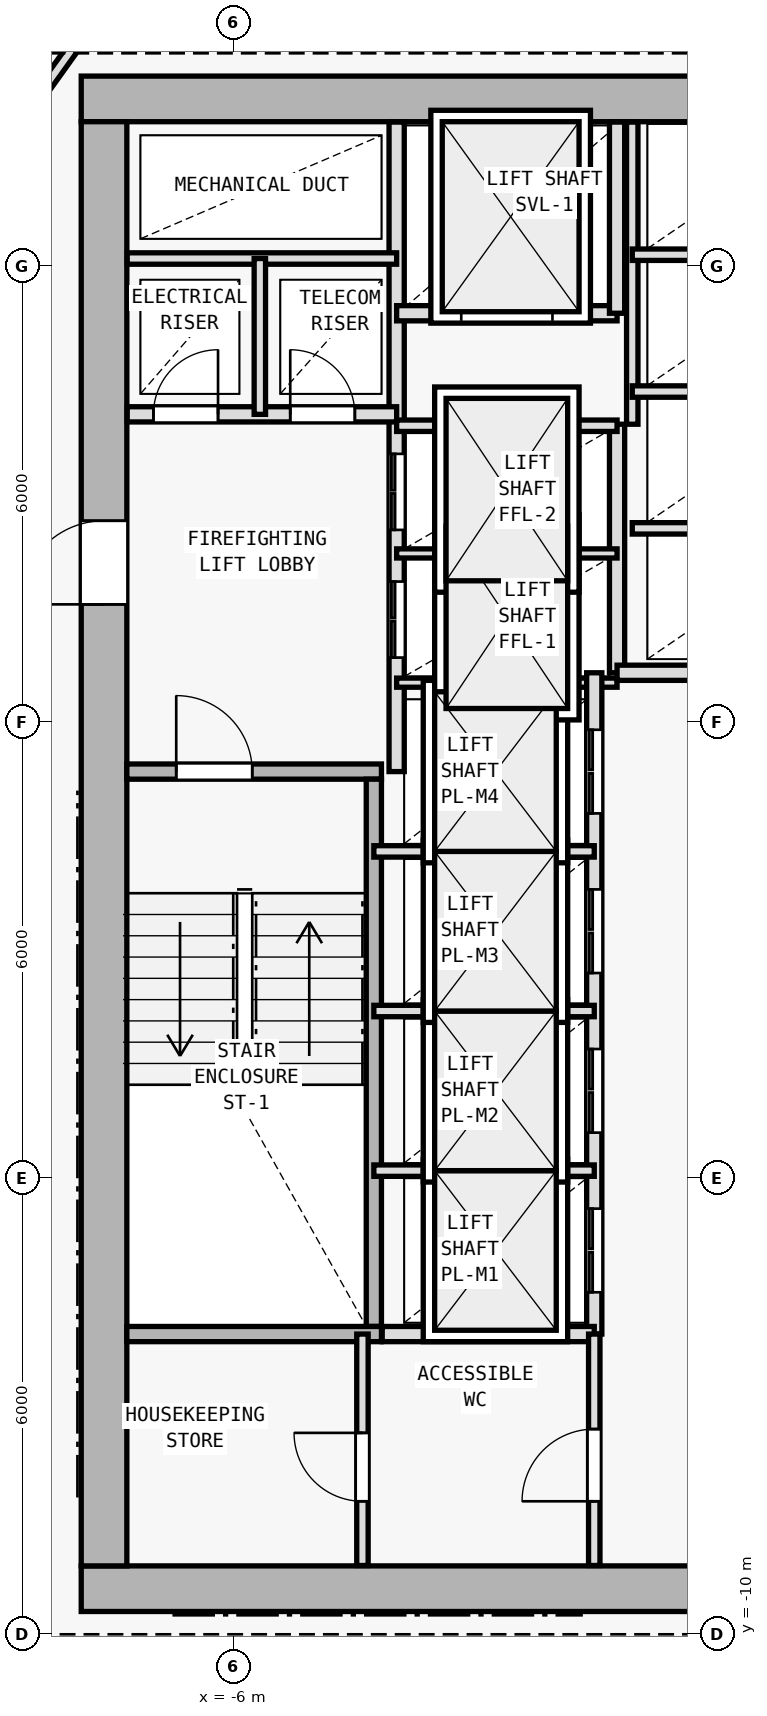
"""IFC4 building model, lengths in metres.
Left out: names, types, materials, properties, quantities, classifications, styles, units other than length and angle.
Written with IfcOpenShell. Run it as: python <this file> out.ifc"""

import sys

from ifc_helpers import new_model, si_unit, direction, frame, frame_2d, origin, origin_2d, place, context, subcontext, project, spatial, rectangle, i_section, extrude, element, fill, save


model = new_model("IFC4")
c1 = context("Model", 3, precision=1e-05, world=origin(), true_north=direction((0.0, 1.0)))
c2 = subcontext(c1, "Body", "Model", "MODEL_VIEW")
j1 = project(units=[si_unit("LENGTHUNIT", "METRE"), si_unit("PLANEANGLEUNIT", "RADIAN")], contexts=[c1])
p1 = place(None, origin())
s1 = spatial("IfcSite", under=j1, at=p1, CompositionType="ELEMENT")
p2 = place(p1, origin())
s2 = spatial("IfcBuilding", under=s1, at=p2, CompositionType="ELEMENT")
p3 = place(p2, frame((0.0, 0.0, 104.1)))
s3 = spatial("IfcBuildingStorey", under=s2, at=p3, CompositionType="ELEMENT", Elevation=104.1)
for number, where, z_axis, x_axis in (
    (1, (-7.7, -9.4, 0.0), (0.0, 0.0, 1.0), (1.0, 0.0, 0.0)),
    (2, (-7.7, 10.2, 0.0), (0.0, 0.0, 1.0), (1.0, 0.0, 0.0)),
    (3, (0.0, -9.4, 0.0), (0.0, 0.0, 1.0), (1.0, 0.0, 0.0)),
    (4, (-7.7, 2.0, 0.0), (0.0, 0.0, 1.0), (1.0, 0.0, 0.0)),
):
    element("IfcColumn", number, at=place(p3, frame(where, z_axis=z_axis, x_axis=x_axis)), inside=s3, PredefinedType="COLUMN", context=c2, shape_type="SweptSolid", body=[
        extrude(i_section(OverallWidth=0.409, OverallDepth=0.425, WebThickness=0.021, FlangeThickness=0.034, FilletRadius=0.015, at=origin_2d()), origin(), (0.0, 0.0, 1.0), 3.6),
    ])
p4 = place(p3, frame((-8.0, -9.4, 0.0), z_axis=(0.0, 0.0, 1.0), x_axis=(1.0, 0.0, 0.0)))
e5 = element("IfcWall", 5, at=p4, inside=s3, PredefinedType="SHEAR", context=c2, shape_type="SweptSolid", body=[
    extrude(rectangle(XDim=16.0, YDim=0.6, at=frame_2d((8.0, 0.0))), origin(), (0.0, 0.0, 1.0), 3.35),
])
p5 = place(p4, frame((9.65, 0.0, 0.0)))
e6 = element("IfcOpeningElement", 6, at=p5, cuts=e5, PredefinedType="OPENING", context=c2, shape_type="SweptSolid", body=[
    extrude(rectangle(XDim=1.5, YDim=2.2, at=frame_2d((0.75, 1.1))), frame((0.0, 0.31, 0.0), z_axis=(0.0, -1.0, 0.0), x_axis=(1.0, 0.0, 0.0)), (0.0, 0.0, 1.0), 0.62),
])
p6 = place(p3, frame((8.0, 10.2, 0.0), z_axis=(0.0, 0.0, 1.0), x_axis=(-1.0, 0.0, 0.0)))
e7 = element("IfcWall", 7, at=p6, inside=s3, PredefinedType="SHEAR", context=c2, shape_type="SweptSolid", body=[
    extrude(rectangle(XDim=16.0, YDim=0.6, at=frame_2d((8.0, 0.0))), origin(), (0.0, 0.0, 1.0), 3.35),
])
p7 = place(p6, frame((4.45, 0.0, 0.0)))
e8 = element("IfcOpeningElement", 8, at=p7, cuts=e7, PredefinedType="OPENING", context=c2, shape_type="SweptSolid", body=[
    extrude(rectangle(XDim=1.1, YDim=2.15, at=frame_2d((0.55, 1.075))), frame((0.0, 0.31, 0.0), z_axis=(0.0, -1.0, 0.0), x_axis=(1.0, 0.0, 0.0)), (0.0, 0.0, 1.0), 0.62),
])
p8 = place(p3, frame((-7.7, -9.1, 0.0), z_axis=(0.0, 0.0, 1.0), x_axis=(0.0, 1.0, 0.0)))
e9 = element("IfcWall", 9, at=p8, inside=s3, PredefinedType="SHEAR", context=c2, shape_type="SweptSolid", body=[
    extrude(rectangle(XDim=19.0, YDim=0.6, at=frame_2d((9.5, 0.0))), origin(), (0.0, 0.0, 1.0), 3.35),
])
p9 = place(p8, frame((12.65, 0.0, 0.0)))
e10 = element("IfcOpeningElement", 10, at=p9, cuts=e9, PredefinedType="OPENING", context=c2, shape_type="SweptSolid", body=[
    extrude(rectangle(XDim=1.1, YDim=2.15, at=frame_2d((0.55, 1.075))), frame((0.0, 0.31, 0.0), z_axis=(0.0, -1.0, 0.0), x_axis=(1.0, 0.0, 0.0)), (0.0, 0.0, 1.0), 0.62),
])
p10 = place(p3, frame((-7.4, 1.35, 0.0), z_axis=(0.0, 0.0, 1.0), x_axis=(1.0, 0.0, 0.0)))
e11 = element("IfcWall", 11, at=p10, inside=s3, PredefinedType="SOLIDWALL", context=c2, shape_type="SweptSolid", body=[
    extrude(rectangle(XDim=3.35, YDim=0.2, at=frame_2d((1.675, 0.0))), origin(), (0.0, 0.0, 1.0), 3.35),
])
p11 = place(p10, frame((0.65, 0.0, 0.0)))
e12 = element("IfcOpeningElement", 12, at=p11, cuts=e11, PredefinedType="OPENING", context=c2, shape_type="SweptSolid", body=[
    extrude(rectangle(XDim=1.0, YDim=2.15, at=frame_2d((0.5, 1.075))), frame((0.0, 0.11, 0.0), z_axis=(0.0, -1.0, 0.0), x_axis=(1.0, 0.0, 0.0)), (0.0, 0.0, 1.0), 0.22),
])
p12 = place(p3, frame((-4.15, -5.95, 0.0), z_axis=(0.0, 0.0, 1.0), x_axis=(0.0, 1.0, 0.0)))
e13 = element("IfcWall", 13, at=p12, inside=s3, PredefinedType="SOLIDWALL", context=c2, shape_type="SweptSolid", body=[
    extrude(rectangle(XDim=7.2, YDim=0.2, at=frame_2d((3.6, 0.0))), origin(), (0.0, 0.0, 1.0), 3.35),
])
p13 = place(p3, frame((-3.85, 1.35, 0.0), z_axis=(0.0, 0.0, 1.0), x_axis=(0.0, 1.0, 0.0)))
e14 = element("IfcWall", 14, at=p13, inside=s3, PredefinedType="SOLIDWALL", context=c2, shape_type="SweptSolid", body=[
    extrude(rectangle(XDim=8.545, YDim=0.2, at=frame_2d((4.272, 0.0))), origin(), (0.0, 0.0, 1.0), 3.35),
])
p14 = place(p13, frame((1.5, 0.0, 0.0)))
e15 = element("IfcOpeningElement", 15, at=p14, cuts=e14, PredefinedType="OPENING", context=c2, shape_type="SweptSolid", body=[
    extrude(rectangle(XDim=1.0, YDim=2.15, at=frame_2d((0.5, 1.075))), frame((0.0, 0.11, 0.0), z_axis=(0.0, -1.0, 0.0), x_axis=(1.0, 0.0, 0.0)), (0.0, 0.0, 1.0), 0.22),
])
p15 = place(p13, frame((3.18, 0.0, 0.0)))
e16 = element("IfcOpeningElement", 16, at=p15, cuts=e14, PredefinedType="OPENING", context=c2, shape_type="SweptSolid", body=[
    extrude(rectangle(XDim=1.0, YDim=2.15, at=frame_2d((0.5, 1.075))), frame((0.0, 0.11, 0.0), z_axis=(0.0, -1.0, 0.0), x_axis=(1.0, 0.0, 0.0)), (0.0, 0.0, 1.0), 0.22),
])
p16 = place(p3, frame((-7.395, 6.05, 0.0), z_axis=(0.0, 0.0, 1.0), x_axis=(1.0, 0.0, 0.0)))
e17 = element("IfcWall", 17, at=p16, inside=s3, PredefinedType="SOLIDWALL", context=c2, shape_type="SweptSolid", body=[
    extrude(rectangle(XDim=3.545, YDim=0.2, at=frame_2d((1.772, 0.0))), origin(), (0.0, 0.0, 1.0), 3.35),
])
p17 = place(p16, frame((0.345, 0.0, 0.0)))
e18 = element("IfcOpeningElement", 18, at=p17, cuts=e17, PredefinedType="OPENING", context=c2, shape_type="SweptSolid", body=[
    extrude(rectangle(XDim=0.85, YDim=2.1, at=frame_2d((0.425, 1.05))), frame((0.0, 0.11, 0.0), z_axis=(0.0, -1.0, 0.0), x_axis=(1.0, 0.0, 0.0)), (0.0, 0.0, 1.0), 0.22),
])
p18 = place(p16, frame((2.145, 0.0, 0.0)))
e19 = element("IfcOpeningElement", 19, at=p18, cuts=e17, PredefinedType="OPENING", context=c2, shape_type="SweptSolid", body=[
    extrude(rectangle(XDim=0.85, YDim=2.1, at=frame_2d((0.425, 1.05))), frame((0.0, 0.11, 0.0), z_axis=(0.0, -1.0, 0.0), x_axis=(1.0, 0.0, 0.0)), (0.0, 0.0, 1.0), 0.22),
])
p19 = place(p3, frame((-7.395, 8.1, 0.0), z_axis=(0.0, 0.0, 1.0), x_axis=(1.0, 0.0, 0.0)))
e20 = element("IfcWall", 20, at=p19, inside=s3, PredefinedType="PARTITIONING", context=c2, shape_type="SweptSolid", body=[
    extrude(rectangle(XDim=3.545, YDim=0.15, at=frame_2d((1.772, 0.0))), origin(), (0.0, 0.0, 1.0), 3.35),
])
p20 = place(p3, frame((-5.65, 6.05, 0.0), z_axis=(0.0, 0.0, 1.0), x_axis=(0.0, 1.0, 0.0)))
e21 = element("IfcWall", 21, at=p20, inside=s3, PredefinedType="PARTITIONING", context=c2, shape_type="SweptSolid", body=[
    extrude(rectangle(XDim=2.05, YDim=0.15, at=frame_2d((1.025, 0.0))), origin(), (0.0, 0.0, 1.0), 3.35),
])
p21 = place(p3, frame((-0.95, 2.65, 0.0), z_axis=(0.0, 0.0, 1.0), x_axis=(0.0, 1.0, 0.0)))
e22 = element("IfcWall", 22, at=p21, inside=s3, PredefinedType="SOLIDWALL", context=c2, shape_type="SweptSolid", body=[
    extrude(rectangle(XDim=3.27, YDim=0.2, at=frame_2d((1.635, 0.0))), origin(), (0.0, 0.0, 1.0), 3.35),
])
for number, where, z_axis, x_axis in (
    (23, (-3.85, 2.52, 0.0), (0.0, 0.0, 1.0), (1.0, 0.0, 0.0)),
    (24, (-3.85, 4.22, 0.0), (0.0, 0.0, 1.0), (1.0, 0.0, 0.0)),
):
    element("IfcWall", number, at=place(p3, frame(where, z_axis=z_axis, x_axis=x_axis)), inside=s3, PredefinedType="PARTITIONING", context=c2, shape_type="SweptSolid", body=[
        extrude(rectangle(XDim=2.9, YDim=0.12, at=frame_2d((1.45, 0.0))), origin(), (0.0, 0.0, 1.0), 3.35),
    ])
p22 = place(p3, frame((-3.85, 5.9, 0.0), z_axis=(0.0, 0.0, 1.0), x_axis=(1.0, 0.0, 0.0)))
e25 = element("IfcWall", 25, at=p22, inside=s3, PredefinedType="PARTITIONING", context=c2, shape_type="SweptSolid", body=[
    extrude(rectangle(XDim=2.9, YDim=0.15, at=frame_2d((1.45, 0.0))), origin(), (0.0, 0.0, 1.0), 3.35),
])
p23 = place(p3, frame((-3.85, 7.38, 0.0), z_axis=(0.0, 0.0, 1.0), x_axis=(1.0, 0.0, 0.0)))
e26 = element("IfcWall", 26, at=p23, inside=s3, PredefinedType="SOLIDWALL", context=c2, shape_type="SweptSolid", body=[
    extrude(rectangle(XDim=2.9, YDim=0.2, at=frame_2d((1.45, 0.0))), origin(), (0.0, 0.0, 1.0), 3.35),
])
p24 = place(p23, frame((0.85, 0.0, 0.0)))
e27 = element("IfcOpeningElement", 27, at=p24, cuts=e26, PredefinedType="OPENING", context=c2, shape_type="SweptSolid", body=[
    extrude(rectangle(XDim=1.2, YDim=2.2, at=frame_2d((0.6, 1.1))), frame((0.0, 0.11, 0.0), z_axis=(0.0, -1.0, 0.0), x_axis=(1.0, 0.0, 0.0)), (0.0, 0.0, 1.0), 0.22),
])
p25 = place(p3, frame((-0.95, 7.38, 0.0), z_axis=(0.0, 0.0, 1.0), x_axis=(0.0, 1.0, 0.0)))
e28 = element("IfcWall", 28, at=p25, inside=s3, PredefinedType="SOLIDWALL", context=c2, shape_type="SweptSolid", body=[
    extrude(rectangle(XDim=2.515, YDim=0.2, at=frame_2d((1.258, 0.0))), origin(), (0.0, 0.0, 1.0), 3.35),
])
p26 = place(p3, frame((-1.25, -6.05, 0.0), z_axis=(0.0, 0.0, 1.0), x_axis=(0.0, 1.0, 0.0)))
e29 = element("IfcWall", 29, at=p26, inside=s3, PredefinedType="SOLIDWALL", context=c2, shape_type="SweptSolid", body=[
    extrude(rectangle(XDim=8.7, YDim=0.2, at=frame_2d((4.35, 0.0))), origin(), (0.0, 0.0, 1.0), 3.35),
])
p27 = place(p26, frame((0.55, 0.0, 0.0)))
e30 = element("IfcOpeningElement", 30, at=p27, cuts=e29, PredefinedType="OPENING", context=c2, shape_type="SweptSolid", body=[
    extrude(rectangle(XDim=1.1, YDim=2.15, at=frame_2d((0.55, 1.075))), frame((0.0, 0.11, 0.0), z_axis=(0.0, -1.0, 0.0), x_axis=(1.0, 0.0, 0.0)), (0.0, 0.0, 1.0), 0.22),
])
p28 = place(p26, frame((2.65, 0.0, 0.0)))
e31 = element("IfcOpeningElement", 31, at=p28, cuts=e29, PredefinedType="OPENING", context=c2, shape_type="SweptSolid", body=[
    extrude(rectangle(XDim=1.1, YDim=2.15, at=frame_2d((0.55, 1.075))), frame((0.0, 0.11, 0.0), z_axis=(0.0, -1.0, 0.0), x_axis=(1.0, 0.0, 0.0)), (0.0, 0.0, 1.0), 0.22),
])
p29 = place(p26, frame((4.75, 0.0, 0.0)))
e32 = element("IfcOpeningElement", 32, at=p29, cuts=e29, PredefinedType="OPENING", context=c2, shape_type="SweptSolid", body=[
    extrude(rectangle(XDim=1.1, YDim=2.15, at=frame_2d((0.55, 1.075))), frame((0.0, 0.11, 0.0), z_axis=(0.0, -1.0, 0.0), x_axis=(1.0, 0.0, 0.0)), (0.0, 0.0, 1.0), 0.22),
])
p30 = place(p26, frame((6.85, 0.0, 0.0)))
e33 = element("IfcOpeningElement", 33, at=p30, cuts=e29, PredefinedType="OPENING", context=c2, shape_type="SweptSolid", body=[
    extrude(rectangle(XDim=1.1, YDim=2.15, at=frame_2d((0.55, 1.075))), frame((0.0, 0.11, 0.0), z_axis=(0.0, -1.0, 0.0), x_axis=(1.0, 0.0, 0.0)), (0.0, 0.0, 1.0), 0.22),
])
for number, where, z_axis, x_axis in (
    (34, (-4.15, -3.9, 0.0), (0.0, 0.0, 1.0), (1.0, 0.0, 0.0)),
    (35, (-4.15, -1.8, 0.0), (0.0, 0.0, 1.0), (1.0, 0.0, 0.0)),
    (36, (-4.15, 0.3, 0.0), (0.0, 0.0, 1.0), (1.0, 0.0, 0.0)),
):
    element("IfcWall", number, at=place(p3, frame(where, z_axis=z_axis, x_axis=x_axis)), inside=s3, PredefinedType="PARTITIONING", context=c2, shape_type="SweptSolid", body=[
        extrude(rectangle(XDim=2.9, YDim=0.15, at=frame_2d((1.45, 0.0))), origin(), (0.0, 0.0, 1.0), 3.35),
    ])
p31 = place(p3, frame((-0.95, 2.65, 0.0), z_axis=(0.0, 0.0, 1.0), x_axis=(1.0, 0.0, 0.0)))
e37 = element("IfcWall", 37, at=p31, inside=s3, PredefinedType="SOLIDWALL", context=c2, shape_type="SweptSolid", body=[
    extrude(rectangle(XDim=2.9, YDim=0.2, at=frame_2d((1.45, 0.0))), origin(), (0.0, 0.0, 1.0), 3.35),
])
p32 = place(p3, frame((-0.75, 5.92, 0.0), z_axis=(0.0, 0.0, 1.0), x_axis=(0.0, 1.0, 0.0)))
e38 = element("IfcWall", 38, at=p32, inside=s3, PredefinedType="PARTITIONING", context=c2, shape_type="SweptSolid", body=[
    extrude(rectangle(XDim=3.975, YDim=0.15, at=frame_2d((1.988, 0.0))), origin(), (0.0, 0.0, 1.0), 3.35),
])
for number, where, z_axis, x_axis in (
    (39, (-0.75, 4.55, 0.0), (0.0, 0.0, 1.0), (1.0, 0.0, 0.0)),
    (40, (-0.75, 6.35, 0.0), (0.0, 0.0, 1.0), (1.0, 0.0, 0.0)),
    (41, (-0.75, 8.15, 0.0), (0.0, 0.0, 1.0), (1.0, 0.0, 0.0)),
):
    element("IfcWall", number, at=place(p3, frame(where, z_axis=z_axis, x_axis=x_axis)), inside=s3, PredefinedType="PARTITIONING", context=c2, shape_type="SweptSolid", body=[
        extrude(rectangle(XDim=2.7, YDim=0.15, at=frame_2d((1.35, 0.0))), origin(), (0.0, 0.0, 1.0), 3.35),
    ])
p33 = place(p3, frame((-7.4, -6.05, 0.0), z_axis=(0.0, 0.0, 1.0), x_axis=(1.0, 0.0, 0.0)))
e42 = element("IfcWall", 42, at=p33, inside=s3, PredefinedType="SOLIDWALL", context=c2, shape_type="SweptSolid", body=[
    extrude(rectangle(XDim=3.35, YDim=0.2, at=frame_2d((1.675, 0.0))), origin(), (0.0, 0.0, 1.0), 3.35),
])
p34 = place(p3, frame((-4.04, -6.05, 0.0), z_axis=(0.0, 0.0, 1.0), x_axis=(1.0, 0.0, 0.0)))
e43 = element("IfcWall", 43, at=p34, inside=s3, PredefinedType="SOLIDWALL", context=c2, shape_type="SweptSolid", body=[
    extrude(rectangle(XDim=2.79, YDim=0.2, at=frame_2d((1.395, 0.0))), origin(), (0.0, 0.0, 1.0), 3.35),
])
p35 = place(p3, frame((-1.25, -9.095, 0.0), z_axis=(0.0, 0.0, 1.0), x_axis=(0.0, 1.0, 0.0)))
e44 = element("IfcWall", 44, at=p35, inside=s3, PredefinedType="PARTITIONING", context=c2, shape_type="SweptSolid", body=[
    extrude(rectangle(XDim=3.045, YDim=0.15, at=frame_2d((1.522, 0.0))), origin(), (0.0, 0.0, 1.0), 3.35),
])
p36 = place(p35, frame((0.845, 0.0, 0.0)))
e45 = element("IfcOpeningElement", 45, at=p36, cuts=e44, PredefinedType="OPENING", context=c2, shape_type="SweptSolid", body=[
    extrude(rectangle(XDim=0.95, YDim=2.1, at=frame_2d((0.475, 1.05))), frame((0.0, 0.085, 0.0), z_axis=(0.0, -1.0, 0.0), x_axis=(1.0, 0.0, 0.0)), (0.0, 0.0, 1.0), 0.17),
])
p37 = place(p3, frame((-4.3, -9.095, 0.0), z_axis=(0.0, 0.0, 1.0), x_axis=(0.0, 1.0, 0.0)))
e46 = element("IfcWall", 46, at=p37, inside=s3, PredefinedType="PARTITIONING", context=c2, shape_type="SweptSolid", body=[
    extrude(rectangle(XDim=3.045, YDim=0.15, at=frame_2d((1.522, 0.0))), origin(), (0.0, 0.0, 1.0), 3.35),
])
p38 = place(p37, frame((0.845, 0.0, 0.0)))
e47 = element("IfcOpeningElement", 47, at=p38, cuts=e46, PredefinedType="OPENING", context=c2, shape_type="SweptSolid", body=[
    extrude(rectangle(XDim=0.9, YDim=2.1, at=frame_2d((0.45, 1.05))), frame((0.0, 0.085, 0.0), z_axis=(0.0, -1.0, 0.0), x_axis=(1.0, 0.0, 0.0)), (0.0, 0.0, 1.0), 0.17),
])
p39 = place(p3, frame((-9.86, 8.426, 0.0), z_axis=(0.0, 0.0, 1.0), x_axis=(0.582449511476, 0.812866881218, 0.0)))
e48 = element("IfcWall", 48, at=p39, inside=s3, PredefinedType="PARTITIONING", context=c2, shape_type="SweptSolid", body=[
    extrude(rectangle(XDim=4.84, YDim=0.15, at=frame_2d((2.42, 0.0))), origin(), (0.0, 0.0, 1.0), 2.725),
])
p40 = place(p9, origin())
e49 = element("IfcDoor", 49, at=p40, inside=s3, OperationType="SINGLE_SWING_LEFT", PredefinedType="DOOR", context=c2, shape_type="SweptSolid", body=[
    extrude(rectangle(XDim=1.1, YDim=2.15, at=frame_2d((0.55, 1.075))), frame((0.0, 0.025, 0.0), z_axis=(0.0, -1.0, 0.0), x_axis=(1.0, 0.0, 0.0)), (0.0, 0.0, 1.0), 0.05),
])
fill(e10, e49)
p41 = place(p11, origin())
e50 = element("IfcDoor", 50, at=p41, inside=s3, OperationType="SINGLE_SWING_LEFT", PredefinedType="DOOR", context=c2, shape_type="SweptSolid", body=[
    extrude(rectangle(XDim=1.0, YDim=2.15, at=frame_2d((0.5, 1.075))), frame((0.0, 0.025, 0.0), z_axis=(0.0, -1.0, 0.0), x_axis=(1.0, 0.0, 0.0)), (0.0, 0.0, 1.0), 0.05),
])
fill(e12, e50)
p42 = place(p17, origin())
e51 = element("IfcDoor", 51, at=p42, inside=s3, OperationType="SINGLE_SWING_RIGHT", PredefinedType="DOOR", context=c2, shape_type="SweptSolid", body=[
    extrude(rectangle(XDim=0.85, YDim=2.1, at=frame_2d((0.425, 1.05))), frame((0.0, 0.025, 0.0), z_axis=(0.0, -1.0, 0.0), x_axis=(1.0, 0.0, 0.0)), (0.0, 0.0, 1.0), 0.05),
])
fill(e18, e51)
p43 = place(p18, origin())
e52 = element("IfcDoor", 52, at=p43, inside=s3, OperationType="SINGLE_SWING_LEFT", PredefinedType="DOOR", context=c2, shape_type="SweptSolid", body=[
    extrude(rectangle(XDim=0.85, YDim=2.1, at=frame_2d((0.425, 1.05))), frame((0.0, 0.025, 0.0), z_axis=(0.0, -1.0, 0.0), x_axis=(1.0, 0.0, 0.0)), (0.0, 0.0, 1.0), 0.05),
])
fill(e19, e52)
p44 = place(p24, origin())
e53 = element("IfcDoor", 53, at=p44, inside=s3, OperationType="DOUBLE_DOOR_SLIDING", PredefinedType="DOOR", context=c2, shape_type="SweptSolid", body=[
    extrude(rectangle(XDim=1.2, YDim=2.2, at=frame_2d((0.6, 1.1))), frame((0.0, 0.025, 0.0), z_axis=(0.0, -1.0, 0.0), x_axis=(1.0, 0.0, 0.0)), (0.0, 0.0, 1.0), 0.05),
])
fill(e27, e53)
p45 = place(p27, origin())
e54 = element("IfcDoor", 54, at=p45, inside=s3, OperationType="DOUBLE_DOOR_SLIDING", PredefinedType="DOOR", context=c2, shape_type="SweptSolid", body=[
    extrude(rectangle(XDim=1.1, YDim=2.15, at=frame_2d((0.55, 1.075))), frame((0.0, 0.025, 0.0), z_axis=(0.0, -1.0, 0.0), x_axis=(1.0, 0.0, 0.0)), (0.0, 0.0, 1.0), 0.05),
])
fill(e30, e54)
p46 = place(p28, origin())
e55 = element("IfcDoor", 55, at=p46, inside=s3, OperationType="DOUBLE_DOOR_SLIDING", PredefinedType="DOOR", context=c2, shape_type="SweptSolid", body=[
    extrude(rectangle(XDim=1.1, YDim=2.15, at=frame_2d((0.55, 1.075))), frame((0.0, 0.025, 0.0), z_axis=(0.0, -1.0, 0.0), x_axis=(1.0, 0.0, 0.0)), (0.0, 0.0, 1.0), 0.05),
])
fill(e31, e55)
p47 = place(p29, origin())
e56 = element("IfcDoor", 56, at=p47, inside=s3, OperationType="DOUBLE_DOOR_SLIDING", PredefinedType="DOOR", context=c2, shape_type="SweptSolid", body=[
    extrude(rectangle(XDim=1.1, YDim=2.15, at=frame_2d((0.55, 1.075))), frame((0.0, 0.025, 0.0), z_axis=(0.0, -1.0, 0.0), x_axis=(1.0, 0.0, 0.0)), (0.0, 0.0, 1.0), 0.05),
])
fill(e32, e56)
p48 = place(p30, origin())
e57 = element("IfcDoor", 57, at=p48, inside=s3, OperationType="DOUBLE_DOOR_SLIDING", PredefinedType="DOOR", context=c2, shape_type="SweptSolid", body=[
    extrude(rectangle(XDim=1.1, YDim=2.15, at=frame_2d((0.55, 1.075))), frame((0.0, 0.025, 0.0), z_axis=(0.0, -1.0, 0.0), x_axis=(1.0, 0.0, 0.0)), (0.0, 0.0, 1.0), 0.05),
])
fill(e33, e57)
p49 = place(p14, origin())
e58 = element("IfcDoor", 58, at=p49, inside=s3, OperationType="DOUBLE_DOOR_SLIDING", PredefinedType="DOOR", context=c2, shape_type="SweptSolid", body=[
    extrude(rectangle(XDim=1.0, YDim=2.15, at=frame_2d((0.5, 1.075))), frame((0.0, 0.025, 0.0), z_axis=(0.0, -1.0, 0.0), x_axis=(1.0, 0.0, 0.0)), (0.0, 0.0, 1.0), 0.05),
])
fill(e15, e58)
p50 = place(p15, origin())
e59 = element("IfcDoor", 59, at=p50, inside=s3, OperationType="DOUBLE_DOOR_SLIDING", PredefinedType="DOOR", context=c2, shape_type="SweptSolid", body=[
    extrude(rectangle(XDim=1.0, YDim=2.15, at=frame_2d((0.5, 1.075))), frame((0.0, 0.025, 0.0), z_axis=(0.0, -1.0, 0.0), x_axis=(1.0, 0.0, 0.0)), (0.0, 0.0, 1.0), 0.05),
])
fill(e16, e59)
p51 = place(p36, origin())
e60 = element("IfcDoor", 60, at=p51, inside=s3, OperationType="SINGLE_SWING_LEFT", PredefinedType="DOOR", context=c2, shape_type="SweptSolid", body=[
    extrude(rectangle(XDim=0.95, YDim=2.1, at=frame_2d((0.475, 1.05))), frame((0.0, 0.025, 0.0), z_axis=(0.0, -1.0, 0.0), x_axis=(1.0, 0.0, 0.0)), (0.0, 0.0, 1.0), 0.05),
])
fill(e45, e60)
p52 = place(p38, origin())
e61 = element("IfcDoor", 61, at=p52, inside=s3, OperationType="SINGLE_SWING_RIGHT", PredefinedType="DOOR", context=c2, shape_type="SweptSolid", body=[
    extrude(rectangle(XDim=0.9, YDim=2.1, at=frame_2d((0.45, 1.05))), frame((0.0, 0.025, 0.0), z_axis=(0.0, -1.0, 0.0), x_axis=(1.0, 0.0, 0.0)), (0.0, 0.0, 1.0), 0.05),
])
fill(e47, e61)
save(model, sys.argv[1])
